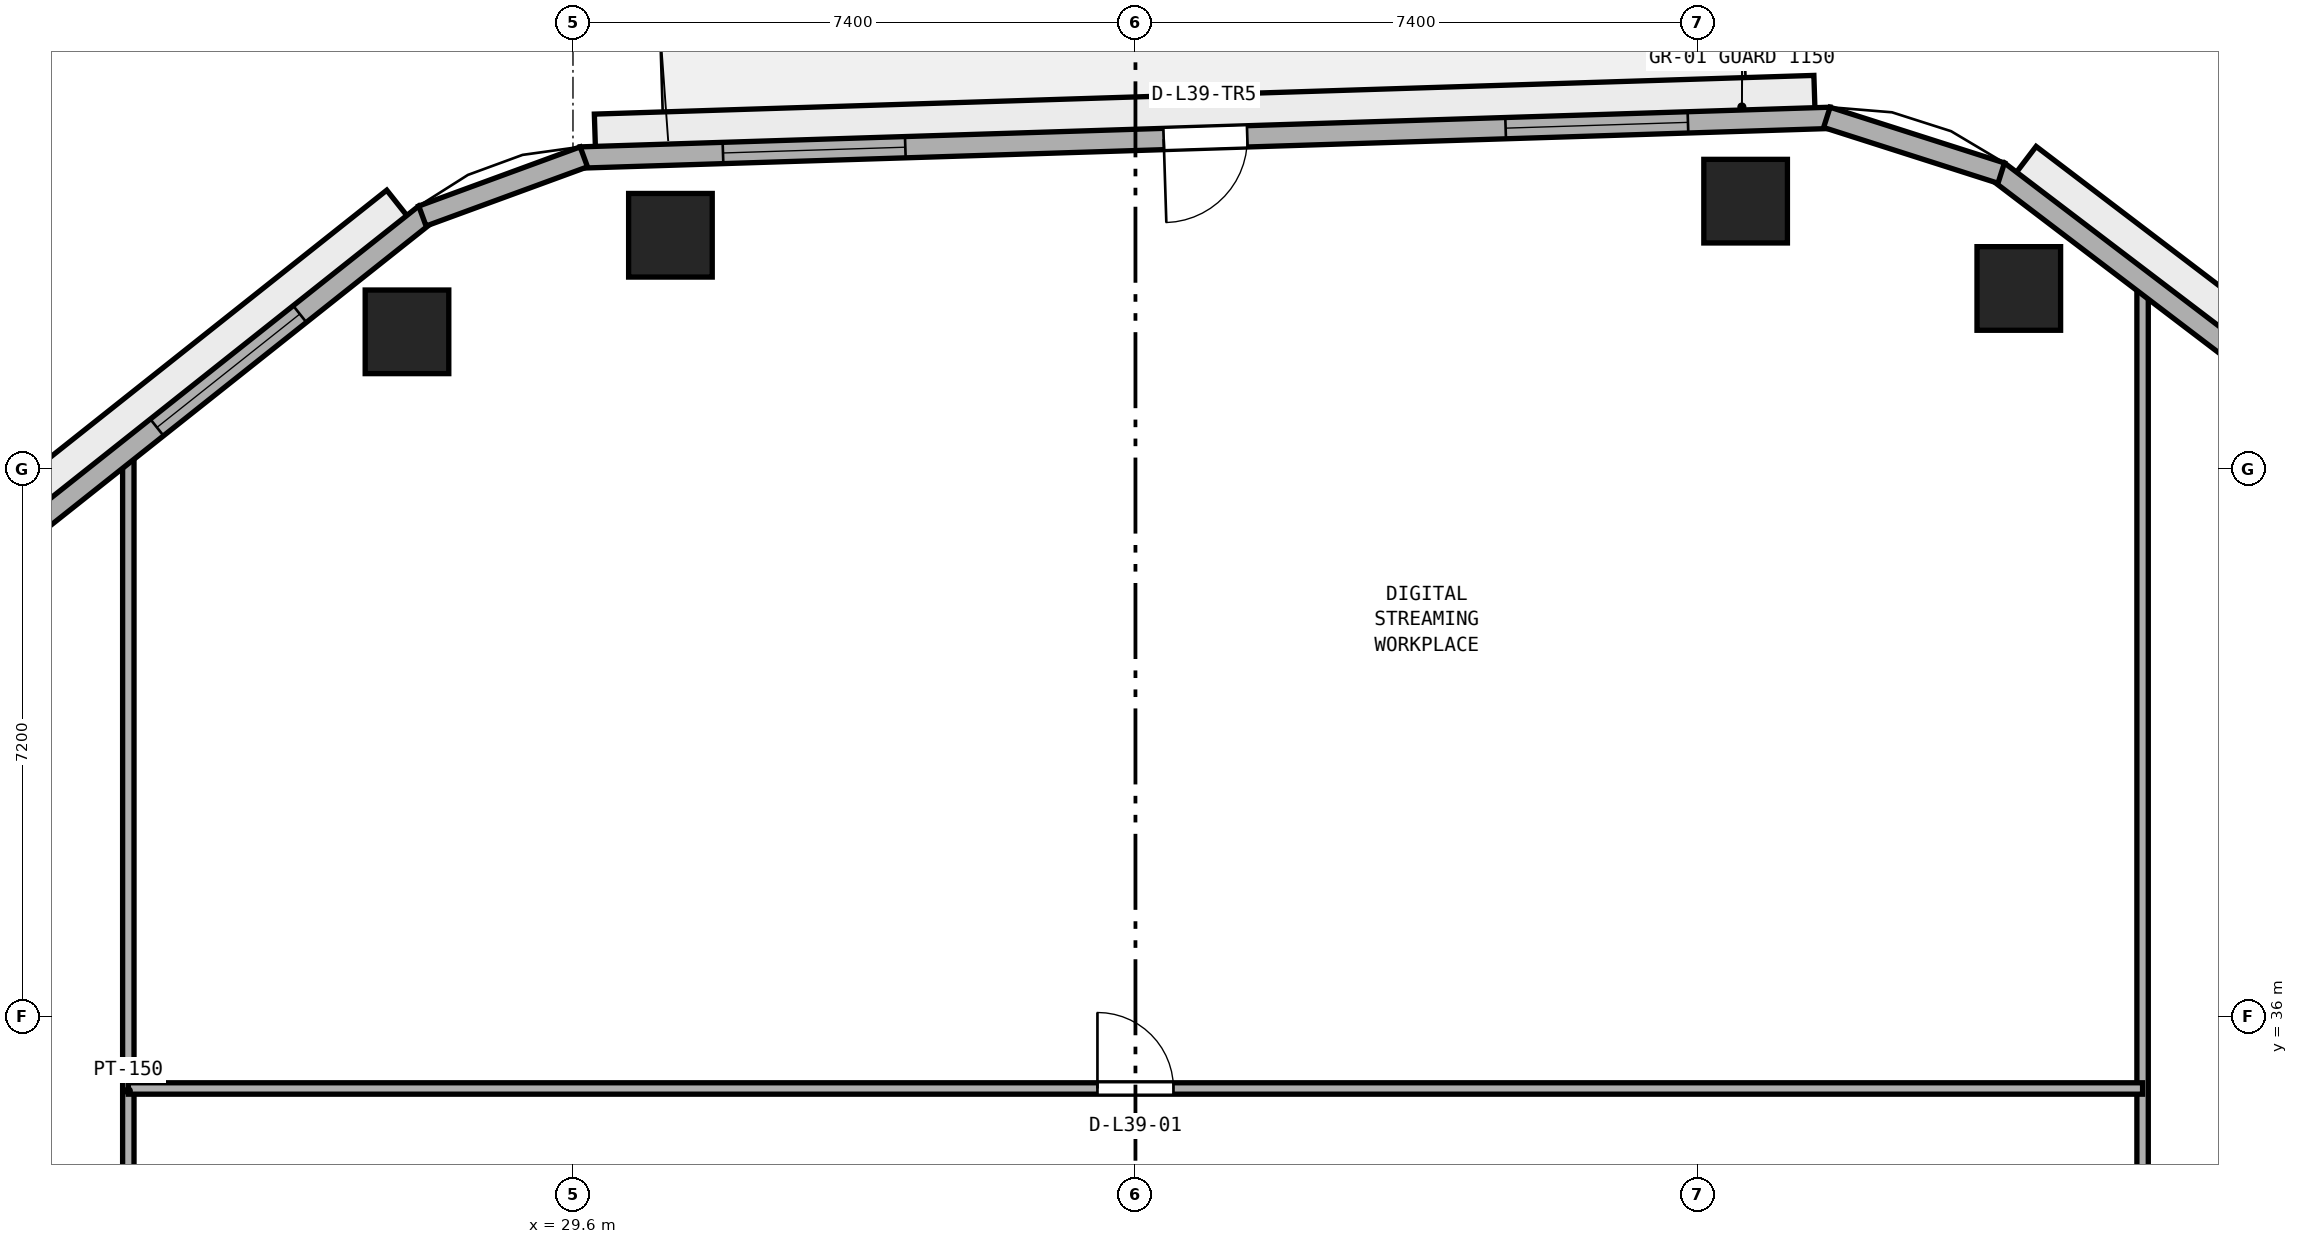
"""IFC4 building model, lengths in metres.
Left out: names, types, materials, properties, quantities, classifications, styles, units other than length and angle.
Written with IfcOpenShell. Run it as: python <this file> out.ifc"""

import sys

from ifc_helpers import new_model, si_unit, direction, frame, frame_2d, origin, origin_2d, place, context, subcontext, project, spatial, rectangle, extrude, element, fill, save


model = new_model("IFC4")
c1 = context("Model", 3, precision=1e-05, world=origin(), true_north=direction((0.0, 1.0)))
c2 = subcontext(c1, "Body", "Model", "MODEL_VIEW")
j1 = project(units=[si_unit("LENGTHUNIT", "METRE"), si_unit("PLANEANGLEUNIT", "RADIAN")], contexts=[c1])
p1 = place(None, origin())
s1 = spatial("IfcSite", under=j1, at=p1, CompositionType="ELEMENT")
p2 = place(p1, origin())
s2 = spatial("IfcBuilding", under=s1, at=p2, CompositionType="ELEMENT")
p3 = place(p2, frame((0.0, 0.0, 155.4)))
s3 = spatial("IfcBuildingStorey", under=s2, at=p3, CompositionType="ELEMENT", Elevation=155.4)
for number, where, z_axis, x_axis in (
    (1, (48.622, 45.575, 0.0), (0.0, 0.0, 1.0), (1.0, 0.0, 0.0)),
    (2, (45.028, 46.724, 0.0), (0.0, 0.0, 1.0), (1.0, 0.0, 0.0)),
    (3, (30.882, 46.275, 0.0), (0.0, 0.0, 1.0), (1.0, 0.0, 0.0)),
    (4, (27.416, 45.004, 0.0), (0.0, 0.0, 1.0), (1.0, 0.0, 0.0)),
):
    element("IfcColumn", number, at=place(p3, frame(where, z_axis=z_axis, x_axis=x_axis)), inside=s3, PredefinedType="COLUMN", context=c2, shape_type="SweptSolid", body=[
        extrude(rectangle(XDim=1.1, YDim=1.1, at=origin_2d()), origin(), (0.0, 0.0, 1.0), 3.8),
    ])
p4 = place(p3, frame((50.25, 26.55, 0.0), z_axis=(0.0, 0.0, 1.0), x_axis=(0.0, 1.0, 0.0)))
e5 = element("IfcWall", 5, at=p4, inside=s3, PredefinedType="PARTITIONING", context=c2, shape_type="SweptSolid", body=[
    extrude(rectangle(XDim=19.154, YDim=0.15, at=frame_2d((9.577, 0.0))), origin(), (0.0, 0.0, 1.0), 3.54),
])
p5 = place(p4, frame((5.725, 0.0, 0.0)))
e6 = element("IfcOpeningElement", 6, at=p5, cuts=e5, PredefinedType="OPENING", context=c2, shape_type="SweptSolid", body=[
    extrude(rectangle(XDim=0.9, YDim=2.1, at=frame_2d((0.45, 1.05))), frame((0.0, 0.085, 0.0), z_axis=(0.0, -1.0, 0.0), x_axis=(1.0, 0.0, 0.0)), (0.0, 0.0, 1.0), 0.17),
])
p6 = place(p3, frame((23.75, 26.55, 0.0), z_axis=(0.0, 0.0, 1.0), x_axis=(0.0, 1.0, 0.0)))
e7 = element("IfcWall", 7, at=p6, inside=s3, PredefinedType="PARTITIONING", context=c2, shape_type="SweptSolid", body=[
    extrude(rectangle(XDim=16.937, YDim=0.15, at=frame_2d((8.468, 0.0))), origin(), (0.0, 0.0, 1.0), 3.54),
])
p7 = place(p3, frame((23.75, 35.05, 0.0), z_axis=(0.0, 0.0, 1.0), x_axis=(1.0, 0.0, 0.0)))
e8 = element("IfcWall", 8, at=p7, inside=s3, PredefinedType="PARTITIONING", context=c2, shape_type="SweptSolid", body=[
    extrude(rectangle(XDim=26.5, YDim=0.15, at=frame_2d((13.25, 0.0))), origin(), (0.0, 0.0, 1.0), 3.54),
])
p8 = place(p7, frame((12.75, 0.0, 0.0)))
e9 = element("IfcOpeningElement", 9, at=p8, cuts=e8, PredefinedType="OPENING", context=c2, shape_type="SweptSolid", body=[
    extrude(rectangle(XDim=1.0, YDim=2.12, at=frame_2d((0.5, 1.06))), frame((0.0, 0.085, 0.0), z_axis=(0.0, -1.0, 0.0), x_axis=(1.0, 0.0, 0.0)), (0.0, 0.0, 1.0), 0.17),
])
p9 = place(p3, frame((60.295, 38.025, 0.0), z_axis=(0.0, 0.0, 1.0), x_axis=(-0.795831760834, 0.605517801925, 0.0)))
e10 = element("IfcWall", 10, at=p9, inside=s3, PredefinedType="STANDARD", context=c2, shape_type="SweptSolid", body=[
    extrude(rectangle(XDim=15.012, YDim=0.28, at=frame_2d((7.506, 0.0))), origin(), (0.0, 0.0, 1.0), 3.54),
])
p10 = place(p9, frame((2.135, 0.0, 0.9)))
e11 = element("IfcOpeningElement", 11, at=p10, cuts=e10, PredefinedType="OPENING", context=c2, shape_type="SweptSolid", body=[
    extrude(rectangle(XDim=2.4, YDim=1.75, at=frame_2d((1.2, 0.875))), frame((0.0, 0.15, 0.0), z_axis=(0.0, -1.0, 0.0), x_axis=(1.0, 0.0, 0.0)), (0.0, 0.0, 1.0), 0.3),
])
p11 = place(p9, frame((6.306, 0.0, 0.9)))
e12 = element("IfcOpeningElement", 12, at=p11, cuts=e10, PredefinedType="OPENING", context=c2, shape_type="SweptSolid", body=[
    extrude(rectangle(XDim=2.4, YDim=1.75, at=frame_2d((1.2, 0.875))), frame((0.0, 0.15, 0.0), z_axis=(0.0, -1.0, 0.0), x_axis=(1.0, 0.0, 0.0)), (0.0, 0.0, 1.0), 0.3),
])
p12 = place(p3, frame((46.143, 47.82, 0.0), z_axis=(0.0, 0.0, 1.0), x_axis=(-0.999497065256, -0.031711457627, 0.0)))
e13 = element("IfcWall", 13, at=p12, inside=s3, PredefinedType="STANDARD", context=c2, shape_type="SweptSolid", body=[
    extrude(rectangle(XDim=16.452, YDim=0.28, at=frame_2d((8.226, 0.0))), origin(), (0.0, 0.0, 1.0), 3.54),
])
p13 = place(p12, frame((7.676, 0.0, 0.0)))
e14 = element("IfcOpeningElement", 14, at=p13, cuts=e13, PredefinedType="OPENING", context=c2, shape_type="SweptSolid", body=[
    extrude(rectangle(XDim=1.1, YDim=2.2, at=frame_2d((0.55, 1.1))), frame((0.0, 0.15, 0.0), z_axis=(0.0, -1.0, 0.0), x_axis=(1.0, 0.0, 0.0)), (0.0, 0.0, 1.0), 0.3),
])
p14 = place(p12, frame((1.875, 0.0, 0.9)))
e15 = element("IfcOpeningElement", 15, at=p14, cuts=e13, PredefinedType="OPENING", context=c2, shape_type="SweptSolid", body=[
    extrude(rectangle(XDim=2.4, YDim=1.75, at=frame_2d((1.2, 0.875))), frame((0.0, 0.15, 0.0), z_axis=(0.0, -1.0, 0.0), x_axis=(1.0, 0.0, 0.0)), (0.0, 0.0, 1.0), 0.3),
])
p15 = place(p12, frame((12.177, 0.0, 0.9)))
e16 = element("IfcOpeningElement", 16, at=p15, cuts=e13, PredefinedType="OPENING", context=c2, shape_type="SweptSolid", body=[
    extrude(rectangle(XDim=2.4, YDim=1.75, at=frame_2d((1.2, 0.875))), frame((0.0, 0.15, 0.0), z_axis=(0.0, -1.0, 0.0), x_axis=(1.0, 0.0, 0.0)), (0.0, 0.0, 1.0), 0.3),
])
p16 = place(p3, frame((27.658, 46.55, 0.0), z_axis=(0.0, 0.0, 1.0), x_axis=(-0.783266285861, -0.621686356158, 0.0)))
e17 = element("IfcWall", 17, at=p16, inside=s3, PredefinedType="STANDARD", context=c2, shape_type="SweptSolid", body=[
    extrude(rectangle(XDim=16.353, YDim=0.28, at=frame_2d((8.177, 0.0))), origin(), (0.0, 0.0, 1.0), 3.54),
])
p17 = place(p16, frame((2.109, 0.0, 0.9)))
e18 = element("IfcOpeningElement", 18, at=p17, cuts=e17, PredefinedType="OPENING", context=c2, shape_type="SweptSolid", body=[
    extrude(rectangle(XDim=2.4, YDim=1.75, at=frame_2d((1.2, 0.875))), frame((0.0, 0.15, 0.0), z_axis=(0.0, -1.0, 0.0), x_axis=(1.0, 0.0, 0.0)), (0.0, 0.0, 1.0), 0.3),
])
p18 = place(p16, frame((6.977, 0.0, 0.9)))
e19 = element("IfcOpeningElement", 19, at=p18, cuts=e17, PredefinedType="OPENING", context=c2, shape_type="SweptSolid", body=[
    extrude(rectangle(XDim=2.4, YDim=1.75, at=frame_2d((1.2, 0.875))), frame((0.0, 0.15, 0.0), z_axis=(0.0, -1.0, 0.0), x_axis=(1.0, 0.0, 0.0)), (0.0, 0.0, 1.0), 0.3),
])
p19 = place(p16, frame((11.844, 0.0, 0.9)))
e20 = element("IfcOpeningElement", 20, at=p19, cuts=e17, PredefinedType="OPENING", context=c2, shape_type="SweptSolid", body=[
    extrude(rectangle(XDim=2.4, YDim=1.75, at=frame_2d((1.2, 0.875))), frame((0.0, 0.15, 0.0), z_axis=(0.0, -1.0, 0.0), x_axis=(1.0, 0.0, 0.0)), (0.0, 0.0, 1.0), 0.3),
])
p20 = place(p3, frame((48.39, 47.093, 0.0), z_axis=(0.0, 0.0, 1.0), x_axis=(-0.952542948918, 0.304404222156, 0.0)))
e21 = element("IfcWall", 21, at=p20, inside=s3, PredefinedType="STANDARD", context=c2, shape_type="SweptSolid", body=[
    extrude(rectangle(XDim=2.408, YDim=0.28, at=frame_2d((1.204, 0.0))), origin(), (0.0, 0.0, 1.0), 3.54),
])
p21 = place(p3, frame((29.743, 47.306, 0.0), z_axis=(0.0, 0.0, 1.0), x_axis=(-0.93893328381, -0.344099242302, 0.0)))
e22 = element("IfcWall", 22, at=p21, inside=s3, PredefinedType="STANDARD", context=c2, shape_type="SweptSolid", body=[
    extrude(rectangle(XDim=2.262, YDim=0.28, at=frame_2d((1.131, 0.0))), origin(), (0.0, 0.0, 1.0), 3.54),
])
p22 = place(p8, origin())
e23 = element("IfcDoor", 23, at=p22, inside=s3, OperationType="SINGLE_SWING_LEFT", PredefinedType="DOOR", context=c2, shape_type="SweptSolid", body=[
    extrude(rectangle(XDim=1.0, YDim=2.12, at=frame_2d((0.5, 1.06))), frame((0.0, 0.025, 0.0), z_axis=(0.0, -1.0, 0.0), x_axis=(1.0, 0.0, 0.0)), (0.0, 0.0, 1.0), 0.05),
])
fill(e9, e23)
p23 = place(p13, origin())
e24 = element("IfcDoor", 24, at=p23, inside=s3, OperationType="SINGLE_SWING_RIGHT", PredefinedType="DOOR", context=c2, shape_type="SweptSolid", body=[
    extrude(rectangle(XDim=1.1, YDim=2.2, at=frame_2d((0.55, 1.1))), frame((0.0, 0.025, 0.0), z_axis=(0.0, -1.0, 0.0), x_axis=(1.0, 0.0, 0.0)), (0.0, 0.0, 1.0), 0.05),
])
fill(e14, e24)
p24 = place(p14, origin())
e25 = element("IfcWindow", 25, at=p24, inside=s3, PartitioningType="SINGLE_PANEL", PredefinedType="WINDOW", context=c2, shape_type="SweptSolid", body=[
    extrude(rectangle(XDim=2.4, YDim=1.75, at=frame_2d((1.2, 0.875))), frame((0.0, 0.03, 0.0), z_axis=(0.0, -1.0, 0.0), x_axis=(1.0, 0.0, 0.0)), (0.0, 0.0, 1.0), 0.06),
])
fill(e15, e25)
p25 = place(p15, origin())
e26 = element("IfcWindow", 26, at=p25, inside=s3, PartitioningType="SINGLE_PANEL", PredefinedType="WINDOW", context=c2, shape_type="SweptSolid", body=[
    extrude(rectangle(XDim=2.4, YDim=1.75, at=frame_2d((1.2, 0.875))), frame((0.0, 0.03, 0.0), z_axis=(0.0, -1.0, 0.0), x_axis=(1.0, 0.0, 0.0)), (0.0, 0.0, 1.0), 0.06),
])
fill(e16, e26)
p26 = place(p17, origin())
e27 = element("IfcWindow", 27, at=p26, inside=s3, PartitioningType="SINGLE_PANEL", PredefinedType="WINDOW", context=c2, shape_type="SweptSolid", body=[
    extrude(rectangle(XDim=2.4, YDim=1.75, at=frame_2d((1.2, 0.875))), frame((0.0, 0.03, 0.0), z_axis=(0.0, -1.0, 0.0), x_axis=(1.0, 0.0, 0.0)), (0.0, 0.0, 1.0), 0.06),
])
fill(e18, e27)
save(model, sys.argv[1])
